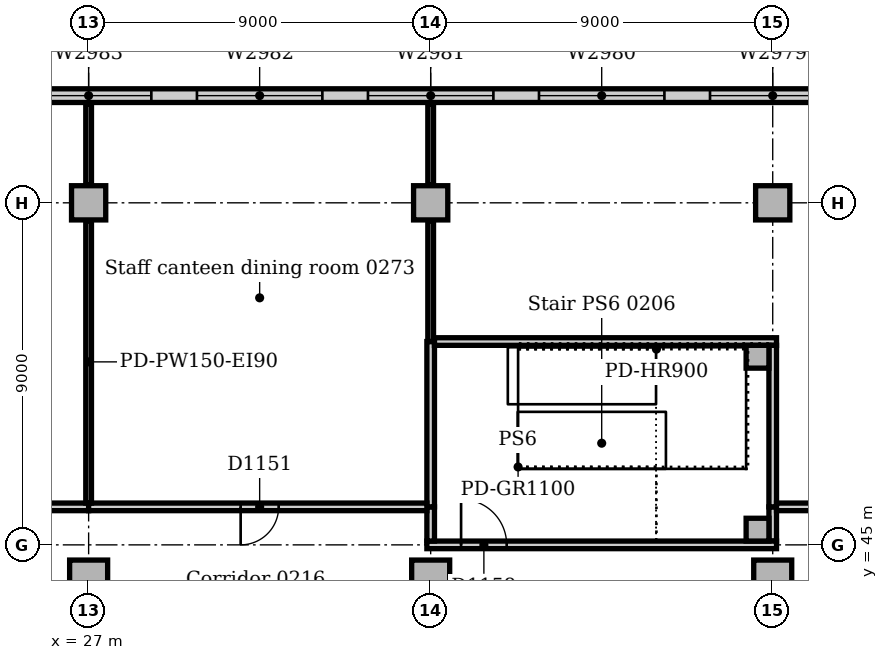
"""IFC4 building model, lengths in metres.
Left out: names, types, materials, properties, quantities, classifications, styles, units other than length and angle.
Written with IfcOpenShell. Run it as: python <this file> out.ifc"""

import sys

from ifc_helpers import new_model, si_unit, direction, frame, frame_2d, origin, origin_2d, place, context, subcontext, project, spatial, rectangle, extrude, element, fill, save


model = new_model("IFC4")
c1 = context("Model", 3, precision=1e-05, world=origin(), true_north=direction((0.0, 1.0)))
c2 = subcontext(c1, "Body", "Model", "MODEL_VIEW")
j1 = project(units=[si_unit("LENGTHUNIT", "METRE"), si_unit("PLANEANGLEUNIT", "RADIAN")], contexts=[c1])
p1 = place(None, origin())
s1 = spatial("IfcSite", under=j1, at=p1, CompositionType="ELEMENT")
p2 = place(p1, origin())
s2 = spatial("IfcBuilding", under=s1, at=p2, CompositionType="ELEMENT")
p3 = place(p2, frame((0.0, 0.0, 11.0)))
s3 = spatial("IfcBuildingStorey", under=s2, at=p3, CompositionType="ELEMENT", Elevation=11.0)
for number, where, z_axis, x_axis in (
    (1, (27.0, 44.1, 0.0), (0.0, 0.0, 1.0), (1.0, 0.0, 0.0)),
    (2, (36.0, 44.1, 0.0), (0.0, 0.0, 1.0), (1.0, 0.0, 0.0)),
    (3, (45.0, 44.1, 0.0), (0.0, 0.0, 1.0), (1.0, 0.0, 0.0)),
):
    element("IfcColumn", number, at=place(p3, frame(where, z_axis=z_axis, x_axis=x_axis)), inside=s3, PredefinedType="COLUMN", context=c2, shape_type="SweptSolid", body=[
        extrude(rectangle(XDim=1.0, YDim=1.0, at=origin_2d()), origin(), (0.0, 0.0, 1.0), 4.7),
    ])
for number, where, z_axis, x_axis in (
    (4, (27.0, 54.0, 0.0), (0.0, 0.0, 1.0), (1.0, 0.0, 0.0)),
    (5, (36.0, 54.0, 0.0), (0.0, 0.0, 1.0), (1.0, 0.0, 0.0)),
    (6, (45.0, 54.0, 0.0), (0.0, 0.0, 1.0), (1.0, 0.0, 0.0)),
):
    element("IfcColumn", number, at=place(p3, frame(where, z_axis=z_axis, x_axis=x_axis)), inside=s3, PredefinedType="COLUMN", context=c2, shape_type="SweptSolid", body=[
        extrude(rectangle(XDim=0.9, YDim=0.9, at=origin_2d()), origin(), (0.0, 0.0, 1.0), 4.7),
    ])
p4 = place(p3, frame((63.0, 56.82, 0.0), z_axis=(0.0, 0.0, 1.0), x_axis=(-1.0, 0.0, 0.0)))
e7 = element("IfcWall", 7, at=p4, inside=s3, PredefinedType="STANDARD", context=c2, shape_type="SweptSolid", body=[
    extrude(rectangle(XDim=144.0, YDim=0.36, at=frame_2d((72.0, 0.0))), origin(), (0.0, 0.0, 1.0), 4.7),
])
p5 = place(p4, frame((2.85, 0.0, 0.9)))
e8 = element("IfcOpeningElement", 8, at=p5, cuts=e7, PredefinedType="OPENING", context=c2, shape_type="SweptSolid", body=[
    extrude(rectangle(XDim=3.3, YDim=2.4, at=frame_2d((1.65, 1.2))), frame((0.0, 0.19, 0.0), z_axis=(0.0, -1.0, 0.0), x_axis=(1.0, 0.0, 0.0)), (0.0, 0.0, 1.0), 0.38),
])
p6 = place(p4, frame((7.35, 0.0, 0.9)))
e9 = element("IfcOpeningElement", 9, at=p6, cuts=e7, PredefinedType="OPENING", context=c2, shape_type="SweptSolid", body=[
    extrude(rectangle(XDim=3.3, YDim=2.4, at=frame_2d((1.65, 1.2))), frame((0.0, 0.19, 0.0), z_axis=(0.0, -1.0, 0.0), x_axis=(1.0, 0.0, 0.0)), (0.0, 0.0, 1.0), 0.38),
])
p7 = place(p4, frame((11.85, 0.0, 0.9)))
e10 = element("IfcOpeningElement", 10, at=p7, cuts=e7, PredefinedType="OPENING", context=c2, shape_type="SweptSolid", body=[
    extrude(rectangle(XDim=3.3, YDim=2.4, at=frame_2d((1.65, 1.2))), frame((0.0, 0.19, 0.0), z_axis=(0.0, -1.0, 0.0), x_axis=(1.0, 0.0, 0.0)), (0.0, 0.0, 1.0), 0.38),
])
p8 = place(p4, frame((16.35, 0.0, 0.9)))
e11 = element("IfcOpeningElement", 11, at=p8, cuts=e7, PredefinedType="OPENING", context=c2, shape_type="SweptSolid", body=[
    extrude(rectangle(XDim=3.3, YDim=2.4, at=frame_2d((1.65, 1.2))), frame((0.0, 0.19, 0.0), z_axis=(0.0, -1.0, 0.0), x_axis=(1.0, 0.0, 0.0)), (0.0, 0.0, 1.0), 0.38),
])
p9 = place(p4, frame((20.85, 0.0, 0.9)))
e12 = element("IfcOpeningElement", 12, at=p9, cuts=e7, PredefinedType="OPENING", context=c2, shape_type="SweptSolid", body=[
    extrude(rectangle(XDim=3.3, YDim=2.4, at=frame_2d((1.65, 1.2))), frame((0.0, 0.19, 0.0), z_axis=(0.0, -1.0, 0.0), x_axis=(1.0, 0.0, 0.0)), (0.0, 0.0, 1.0), 0.38),
])
p10 = place(p4, frame((25.35, 0.0, 0.9)))
e13 = element("IfcOpeningElement", 13, at=p10, cuts=e7, PredefinedType="OPENING", context=c2, shape_type="SweptSolid", body=[
    extrude(rectangle(XDim=3.3, YDim=2.4, at=frame_2d((1.65, 1.2))), frame((0.0, 0.19, 0.0), z_axis=(0.0, -1.0, 0.0), x_axis=(1.0, 0.0, 0.0)), (0.0, 0.0, 1.0), 0.38),
])
p11 = place(p4, frame((29.85, 0.0, 0.9)))
e14 = element("IfcOpeningElement", 14, at=p11, cuts=e7, PredefinedType="OPENING", context=c2, shape_type="SweptSolid", body=[
    extrude(rectangle(XDim=3.3, YDim=2.4, at=frame_2d((1.65, 1.2))), frame((0.0, 0.19, 0.0), z_axis=(0.0, -1.0, 0.0), x_axis=(1.0, 0.0, 0.0)), (0.0, 0.0, 1.0), 0.38),
])
p12 = place(p4, frame((34.35, 0.0, 0.9)))
e15 = element("IfcOpeningElement", 15, at=p12, cuts=e7, PredefinedType="OPENING", context=c2, shape_type="SweptSolid", body=[
    extrude(rectangle(XDim=3.3, YDim=2.4, at=frame_2d((1.65, 1.2))), frame((0.0, 0.19, 0.0), z_axis=(0.0, -1.0, 0.0), x_axis=(1.0, 0.0, 0.0)), (0.0, 0.0, 1.0), 0.38),
])
p13 = place(p4, frame((38.85, 0.0, 0.9)))
e16 = element("IfcOpeningElement", 16, at=p13, cuts=e7, PredefinedType="OPENING", context=c2, shape_type="SweptSolid", body=[
    extrude(rectangle(XDim=3.3, YDim=2.4, at=frame_2d((1.65, 1.2))), frame((0.0, 0.19, 0.0), z_axis=(0.0, -1.0, 0.0), x_axis=(1.0, 0.0, 0.0)), (0.0, 0.0, 1.0), 0.38),
])
p14 = place(p4, frame((43.35, 0.0, 0.9)))
e17 = element("IfcOpeningElement", 17, at=p14, cuts=e7, PredefinedType="OPENING", context=c2, shape_type="SweptSolid", body=[
    extrude(rectangle(XDim=3.3, YDim=2.4, at=frame_2d((1.65, 1.2))), frame((0.0, 0.19, 0.0), z_axis=(0.0, -1.0, 0.0), x_axis=(1.0, 0.0, 0.0)), (0.0, 0.0, 1.0), 0.38),
])
p15 = place(p4, frame((47.85, 0.0, 0.9)))
e18 = element("IfcOpeningElement", 18, at=p15, cuts=e7, PredefinedType="OPENING", context=c2, shape_type="SweptSolid", body=[
    extrude(rectangle(XDim=3.3, YDim=2.4, at=frame_2d((1.65, 1.2))), frame((0.0, 0.19, 0.0), z_axis=(0.0, -1.0, 0.0), x_axis=(1.0, 0.0, 0.0)), (0.0, 0.0, 1.0), 0.38),
])
p16 = place(p4, frame((52.35, 0.0, 0.9)))
e19 = element("IfcOpeningElement", 19, at=p16, cuts=e7, PredefinedType="OPENING", context=c2, shape_type="SweptSolid", body=[
    extrude(rectangle(XDim=3.3, YDim=2.4, at=frame_2d((1.65, 1.2))), frame((0.0, 0.19, 0.0), z_axis=(0.0, -1.0, 0.0), x_axis=(1.0, 0.0, 0.0)), (0.0, 0.0, 1.0), 0.38),
])
p17 = place(p4, frame((56.85, 0.0, 0.9)))
e20 = element("IfcOpeningElement", 20, at=p17, cuts=e7, PredefinedType="OPENING", context=c2, shape_type="SweptSolid", body=[
    extrude(rectangle(XDim=3.3, YDim=2.4, at=frame_2d((1.65, 1.2))), frame((0.0, 0.19, 0.0), z_axis=(0.0, -1.0, 0.0), x_axis=(1.0, 0.0, 0.0)), (0.0, 0.0, 1.0), 0.38),
])
p18 = place(p4, frame((92.85, 0.0, 0.9)))
e21 = element("IfcOpeningElement", 21, at=p18, cuts=e7, PredefinedType="OPENING", context=c2, shape_type="SweptSolid", body=[
    extrude(rectangle(XDim=3.3, YDim=2.4, at=frame_2d((1.65, 1.2))), frame((0.0, 0.19, 0.0), z_axis=(0.0, -1.0, 0.0), x_axis=(1.0, 0.0, 0.0)), (0.0, 0.0, 1.0), 0.38),
])
p19 = place(p4, frame((97.35, 0.0, 0.9)))
e22 = element("IfcOpeningElement", 22, at=p19, cuts=e7, PredefinedType="OPENING", context=c2, shape_type="SweptSolid", body=[
    extrude(rectangle(XDim=3.3, YDim=2.4, at=frame_2d((1.65, 1.2))), frame((0.0, 0.19, 0.0), z_axis=(0.0, -1.0, 0.0), x_axis=(1.0, 0.0, 0.0)), (0.0, 0.0, 1.0), 0.38),
])
p20 = place(p4, frame((101.85, 0.0, 0.9)))
e23 = element("IfcOpeningElement", 23, at=p20, cuts=e7, PredefinedType="OPENING", context=c2, shape_type="SweptSolid", body=[
    extrude(rectangle(XDim=3.3, YDim=2.4, at=frame_2d((1.65, 1.2))), frame((0.0, 0.19, 0.0), z_axis=(0.0, -1.0, 0.0), x_axis=(1.0, 0.0, 0.0)), (0.0, 0.0, 1.0), 0.38),
])
p21 = place(p4, frame((106.35, 0.0, 0.9)))
e24 = element("IfcOpeningElement", 24, at=p21, cuts=e7, PredefinedType="OPENING", context=c2, shape_type="SweptSolid", body=[
    extrude(rectangle(XDim=3.3, YDim=2.4, at=frame_2d((1.65, 1.2))), frame((0.0, 0.19, 0.0), z_axis=(0.0, -1.0, 0.0), x_axis=(1.0, 0.0, 0.0)), (0.0, 0.0, 1.0), 0.38),
])
p22 = place(p4, frame((110.85, 0.0, 0.9)))
e25 = element("IfcOpeningElement", 25, at=p22, cuts=e7, PredefinedType="OPENING", context=c2, shape_type="SweptSolid", body=[
    extrude(rectangle(XDim=3.3, YDim=2.4, at=frame_2d((1.65, 1.2))), frame((0.0, 0.19, 0.0), z_axis=(0.0, -1.0, 0.0), x_axis=(1.0, 0.0, 0.0)), (0.0, 0.0, 1.0), 0.38),
])
p23 = place(p4, frame((115.35, 0.0, 0.9)))
e26 = element("IfcOpeningElement", 26, at=p23, cuts=e7, PredefinedType="OPENING", context=c2, shape_type="SweptSolid", body=[
    extrude(rectangle(XDim=3.3, YDim=2.4, at=frame_2d((1.65, 1.2))), frame((0.0, 0.19, 0.0), z_axis=(0.0, -1.0, 0.0), x_axis=(1.0, 0.0, 0.0)), (0.0, 0.0, 1.0), 0.38),
])
p24 = place(p4, frame((119.85, 0.0, 0.9)))
e27 = element("IfcOpeningElement", 27, at=p24, cuts=e7, PredefinedType="OPENING", context=c2, shape_type="SweptSolid", body=[
    extrude(rectangle(XDim=3.3, YDim=2.4, at=frame_2d((1.65, 1.2))), frame((0.0, 0.19, 0.0), z_axis=(0.0, -1.0, 0.0), x_axis=(1.0, 0.0, 0.0)), (0.0, 0.0, 1.0), 0.38),
])
p25 = place(p4, frame((124.35, 0.0, 0.9)))
e28 = element("IfcOpeningElement", 28, at=p25, cuts=e7, PredefinedType="OPENING", context=c2, shape_type="SweptSolid", body=[
    extrude(rectangle(XDim=3.3, YDim=2.4, at=frame_2d((1.65, 1.2))), frame((0.0, 0.19, 0.0), z_axis=(0.0, -1.0, 0.0), x_axis=(1.0, 0.0, 0.0)), (0.0, 0.0, 1.0), 0.38),
])
p26 = place(p4, frame((128.85, 0.0, 0.9)))
e29 = element("IfcOpeningElement", 29, at=p26, cuts=e7, PredefinedType="OPENING", context=c2, shape_type="SweptSolid", body=[
    extrude(rectangle(XDim=3.3, YDim=2.4, at=frame_2d((1.65, 1.2))), frame((0.0, 0.19, 0.0), z_axis=(0.0, -1.0, 0.0), x_axis=(1.0, 0.0, 0.0)), (0.0, 0.0, 1.0), 0.38),
])
p27 = place(p4, frame((133.35, 0.0, 0.9)))
e30 = element("IfcOpeningElement", 30, at=p27, cuts=e7, PredefinedType="OPENING", context=c2, shape_type="SweptSolid", body=[
    extrude(rectangle(XDim=3.3, YDim=2.4, at=frame_2d((1.65, 1.2))), frame((0.0, 0.19, 0.0), z_axis=(0.0, -1.0, 0.0), x_axis=(1.0, 0.0, 0.0)), (0.0, 0.0, 1.0), 0.38),
])
p28 = place(p4, frame((137.85, 0.0, 0.9)))
e31 = element("IfcOpeningElement", 31, at=p28, cuts=e7, PredefinedType="OPENING", context=c2, shape_type="SweptSolid", body=[
    extrude(rectangle(XDim=3.3, YDim=2.4, at=frame_2d((1.65, 1.2))), frame((0.0, 0.19, 0.0), z_axis=(0.0, -1.0, 0.0), x_axis=(1.0, 0.0, 0.0)), (0.0, 0.0, 1.0), 0.38),
])
for number, where, z_axis, x_axis in (
    (32, (44.6, 49.95, 0.0), (0.0, 0.0, 1.0), (1.0, 0.0, 0.0)),
    (33, (44.6, 45.4, 0.0), (0.0, 0.0, 1.0), (1.0, 0.0, 0.0)),
):
    element("IfcColumn", number, at=place(p3, frame(where, z_axis=z_axis, x_axis=x_axis)), inside=s3, PredefinedType="COLUMN", context=c2, shape_type="SweptSolid", body=[
        extrude(rectangle(XDim=0.6, YDim=0.6, at=origin_2d()), origin(), (0.0, 0.0, 1.0), 5.0),
    ])
p29 = place(p3, frame((45.0, 45.1, 0.0), z_axis=(0.0, 0.0, 1.0), x_axis=(0.0, 1.0, 0.0)))
e34 = element("IfcWall", 34, at=p29, inside=s3, PredefinedType="SOLIDWALL", context=c2, shape_type="SweptSolid", body=[
    extrude(rectangle(XDim=0.9, YDim=0.2, at=frame_2d((0.45, 0.0))), origin(), (0.0, 0.0, 1.0), 4.7),
])
p30 = place(p3, frame((35.9, 45.0, 0.0), z_axis=(0.0, 0.0, 1.0), x_axis=(1.0, 0.0, 0.0)))
e35 = element("IfcWall", 35, at=p30, inside=s3, PredefinedType="SOLIDWALL", context=c2, shape_type="SweptSolid", body=[
    extrude(rectangle(XDim=9.2, YDim=0.2, at=frame_2d((4.6, 0.0))), origin(), (0.0, 0.0, 1.0), 4.7),
])
p31 = place(p30, frame((0.9, 0.0, 0.0)))
e36 = element("IfcOpeningElement", 36, at=p31, cuts=e35, PredefinedType="OPENING", context=c2, shape_type="SweptSolid", body=[
    extrude(rectangle(XDim=1.2, YDim=2.1, at=frame_2d((0.6, 1.05))), frame((0.0, 0.11, 0.0), z_axis=(0.0, -1.0, 0.0), x_axis=(1.0, 0.0, 0.0)), (0.0, 0.0, 1.0), 0.22),
])
p32 = place(p3, frame((36.0, 45.1, 0.0), z_axis=(0.0, 0.0, 1.0), x_axis=(0.0, 1.0, 0.0)))
e37 = element("IfcWall", 37, at=p32, inside=s3, PredefinedType="SOLIDWALL", context=c2, shape_type="SweptSolid", body=[
    extrude(rectangle(XDim=0.9, YDim=0.2, at=frame_2d((0.45, 0.0))), origin(), (0.0, 0.0, 1.0), 4.7),
])
p33 = place(p3, frame((36.0, 46.0, 0.0), z_axis=(0.0, 0.0, 1.0), x_axis=(0.0, 1.0, 0.0)))
e38 = element("IfcWall", 38, at=p33, inside=s3, PredefinedType="SOLIDWALL", context=c2, shape_type="SweptSolid", body=[
    extrude(rectangle(XDim=4.35, YDim=0.2, at=frame_2d((2.175, 0.0))), origin(), (0.0, 0.0, 1.0), 4.7),
])
p34 = place(p3, frame((36.1, 50.35, 0.0), z_axis=(0.0, 0.0, 1.0), x_axis=(1.0, 0.0, 0.0)))
e39 = element("IfcWall", 39, at=p34, inside=s3, PredefinedType="SOLIDWALL", context=c2, shape_type="SweptSolid", body=[
    extrude(rectangle(XDim=9.0, YDim=0.2, at=frame_2d((4.5, 0.0))), origin(), (0.0, 0.0, 1.0), 4.7),
])
p35 = place(p3, frame((45.0, 46.0, 0.0), z_axis=(0.0, 0.0, 1.0), x_axis=(0.0, 1.0, 0.0)))
e40 = element("IfcWall", 40, at=p35, inside=s3, PredefinedType="SOLIDWALL", context=c2, shape_type="SweptSolid", body=[
    extrude(rectangle(XDim=4.25, YDim=0.2, at=frame_2d((2.125, 0.0))), origin(), (0.0, 0.0, 1.0), 4.7),
])
p36 = place(p3, frame((18.0, 46.0, 0.0), z_axis=(0.0, 0.0, 1.0), x_axis=(1.0, 0.0, 0.0)))
e41 = element("IfcWall", 41, at=p36, inside=s3, PredefinedType="PARTITIONING", context=c2, shape_type="SweptSolid", body=[
    extrude(rectangle(XDim=9.0, YDim=0.2, at=frame_2d((4.5, 0.0))), origin(), (0.0, 0.0, 1.0), 4.7),
])
p37 = place(p36, frame((4.0, 0.0, 0.0)))
e42 = element("IfcOpeningElement", 42, at=p37, cuts=e41, PredefinedType="OPENING", context=c2, shape_type="SweptSolid", body=[
    extrude(rectangle(XDim=1.0, YDim=2.1, at=frame_2d((0.5, 1.05))), frame((0.0, 0.11, 0.0), z_axis=(0.0, -1.0, 0.0), x_axis=(1.0, 0.0, 0.0)), (0.0, 0.0, 1.0), 0.22),
])
p38 = place(p3, frame((27.0, 46.0, 0.0), z_axis=(0.0, 0.0, 1.0), x_axis=(1.0, 0.0, 0.0)))
e43 = element("IfcWall", 43, at=p38, inside=s3, PredefinedType="PARTITIONING", context=c2, shape_type="SweptSolid", body=[
    extrude(rectangle(XDim=8.9, YDim=0.2, at=frame_2d((4.45, 0.0))), origin(), (0.0, 0.0, 1.0), 4.7),
])
p39 = place(p38, frame((4.0, 0.0, 0.0)))
e44 = element("IfcOpeningElement", 44, at=p39, cuts=e43, PredefinedType="OPENING", context=c2, shape_type="SweptSolid", body=[
    extrude(rectangle(XDim=1.0, YDim=2.1, at=frame_2d((0.5, 1.05))), frame((0.0, 0.11, 0.0), z_axis=(0.0, -1.0, 0.0), x_axis=(1.0, 0.0, 0.0)), (0.0, 0.0, 1.0), 0.22),
])
p40 = place(p3, frame((45.1, 46.0, 0.0), z_axis=(0.0, 0.0, 1.0), x_axis=(1.0, 0.0, 0.0)))
e45 = element("IfcWall", 45, at=p40, inside=s3, PredefinedType="PARTITIONING", context=c2, shape_type="SweptSolid", body=[
    extrude(rectangle(XDim=8.8, YDim=0.2, at=frame_2d((4.4, 0.0))), origin(), (0.0, 0.0, 1.0), 4.7),
])
p41 = place(p40, frame((3.5, 0.0, 0.0)))
e46 = element("IfcOpeningElement", 46, at=p41, cuts=e45, PredefinedType="OPENING", context=c2, shape_type="SweptSolid", body=[
    extrude(rectangle(XDim=1.8, YDim=2.1, at=frame_2d((0.9, 1.05))), frame((0.0, 0.11, 0.0), z_axis=(0.0, -1.0, 0.0), x_axis=(1.0, 0.0, 0.0)), (0.0, 0.0, 1.0), 0.22),
])
p42 = place(p3, frame((27.0, 46.1, 0.0), z_axis=(0.0, 0.0, 1.0), x_axis=(0.0, 1.0, 0.0)))
e47 = element("IfcWall", 47, at=p42, inside=s3, PredefinedType="PARTITIONING", context=c2, shape_type="SweptSolid", body=[
    extrude(rectangle(XDim=7.43, YDim=0.15, at=frame_2d((3.715, 0.0))), origin(), (0.0, 0.0, 1.0), 4.7),
])
p43 = place(p3, frame((27.0, 54.47, 0.0), z_axis=(0.0, 0.0, 1.0), x_axis=(0.0, 1.0, 0.0)))
e48 = element("IfcWall", 48, at=p43, inside=s3, PredefinedType="PARTITIONING", context=c2, shape_type="SweptSolid", body=[
    extrude(rectangle(XDim=2.13, YDim=0.15, at=frame_2d((1.065, 0.0))), origin(), (0.0, 0.0, 1.0), 4.7),
])
p44 = place(p3, frame((36.0, 50.35, 0.0), z_axis=(0.0, 0.0, 1.0), x_axis=(0.0, 1.0, 0.0)))
e49 = element("IfcWall", 49, at=p44, inside=s3, PredefinedType="PARTITIONING", context=c2, shape_type="SweptSolid", body=[
    extrude(rectangle(XDim=3.18, YDim=0.15, at=frame_2d((1.59, 0.0))), origin(), (0.0, 0.0, 1.0), 4.7),
])
p45 = place(p3, frame((36.0, 54.47, 0.0), z_axis=(0.0, 0.0, 1.0), x_axis=(0.0, 1.0, 0.0)))
e50 = element("IfcWall", 50, at=p45, inside=s3, PredefinedType="PARTITIONING", context=c2, shape_type="SweptSolid", body=[
    extrude(rectangle(XDim=2.13, YDim=0.15, at=frame_2d((1.065, 0.0))), origin(), (0.0, 0.0, 1.0), 4.7),
])
p46 = place(p8, origin())
e51 = element("IfcWindow", 51, at=p46, inside=s3, PartitioningType="SINGLE_PANEL", PredefinedType="WINDOW", context=c2, shape_type="SweptSolid", body=[
    extrude(rectangle(XDim=3.3, YDim=2.4, at=frame_2d((1.65, 1.2))), frame((0.0, 0.13, 0.0), z_axis=(0.0, -1.0, 0.0), x_axis=(1.0, 0.0, 0.0)), (0.0, 0.0, 1.0), 0.06),
])
fill(e11, e51)
p47 = place(p9, origin())
e52 = element("IfcWindow", 52, at=p47, inside=s3, PartitioningType="SINGLE_PANEL", PredefinedType="WINDOW", context=c2, shape_type="SweptSolid", body=[
    extrude(rectangle(XDim=3.3, YDim=2.4, at=frame_2d((1.65, 1.2))), frame((0.0, 0.13, 0.0), z_axis=(0.0, -1.0, 0.0), x_axis=(1.0, 0.0, 0.0)), (0.0, 0.0, 1.0), 0.06),
])
fill(e12, e52)
p48 = place(p10, origin())
e53 = element("IfcWindow", 53, at=p48, inside=s3, PartitioningType="SINGLE_PANEL", PredefinedType="WINDOW", context=c2, shape_type="SweptSolid", body=[
    extrude(rectangle(XDim=3.3, YDim=2.4, at=frame_2d((1.65, 1.2))), frame((0.0, 0.13, 0.0), z_axis=(0.0, -1.0, 0.0), x_axis=(1.0, 0.0, 0.0)), (0.0, 0.0, 1.0), 0.06),
])
fill(e13, e53)
p49 = place(p11, origin())
e54 = element("IfcWindow", 54, at=p49, inside=s3, PartitioningType="SINGLE_PANEL", PredefinedType="WINDOW", context=c2, shape_type="SweptSolid", body=[
    extrude(rectangle(XDim=3.3, YDim=2.4, at=frame_2d((1.65, 1.2))), frame((0.0, 0.13, 0.0), z_axis=(0.0, -1.0, 0.0), x_axis=(1.0, 0.0, 0.0)), (0.0, 0.0, 1.0), 0.06),
])
fill(e14, e54)
p50 = place(p12, origin())
e55 = element("IfcWindow", 55, at=p50, inside=s3, PartitioningType="SINGLE_PANEL", PredefinedType="WINDOW", context=c2, shape_type="SweptSolid", body=[
    extrude(rectangle(XDim=3.3, YDim=2.4, at=frame_2d((1.65, 1.2))), frame((0.0, 0.13, 0.0), z_axis=(0.0, -1.0, 0.0), x_axis=(1.0, 0.0, 0.0)), (0.0, 0.0, 1.0), 0.06),
])
fill(e15, e55)
p51 = place(p39, frame((1.0, 0.0, 0.0), z_axis=(0.0, 0.0, 1.0), x_axis=(-1.0, 0.0, 0.0)))
e56 = element("IfcDoor", 56, at=p51, inside=s3, OperationType="SINGLE_SWING_RIGHT", PredefinedType="DOOR", context=c2, shape_type="SweptSolid", body=[
    extrude(rectangle(XDim=1.0, YDim=2.1, at=frame_2d((0.5, 1.05))), frame((0.0, 0.025, 0.0), z_axis=(0.0, -1.0, 0.0), x_axis=(1.0, 0.0, 0.0)), (0.0, 0.0, 1.0), 0.05),
])
fill(e44, e56)
p52 = place(p31, origin())
e57 = element("IfcDoor", 57, at=p52, inside=s3, OperationType="SINGLE_SWING_LEFT", PredefinedType="DOOR", context=c2, shape_type="SweptSolid", body=[
    extrude(rectangle(XDim=1.2, YDim=2.1, at=frame_2d((0.6, 1.05))), frame((0.0, 0.025, 0.0), z_axis=(0.0, -1.0, 0.0), x_axis=(1.0, 0.0, 0.0)), (0.0, 0.0, 1.0), 0.05),
])
fill(e36, e57)
save(model, sys.argv[1])
